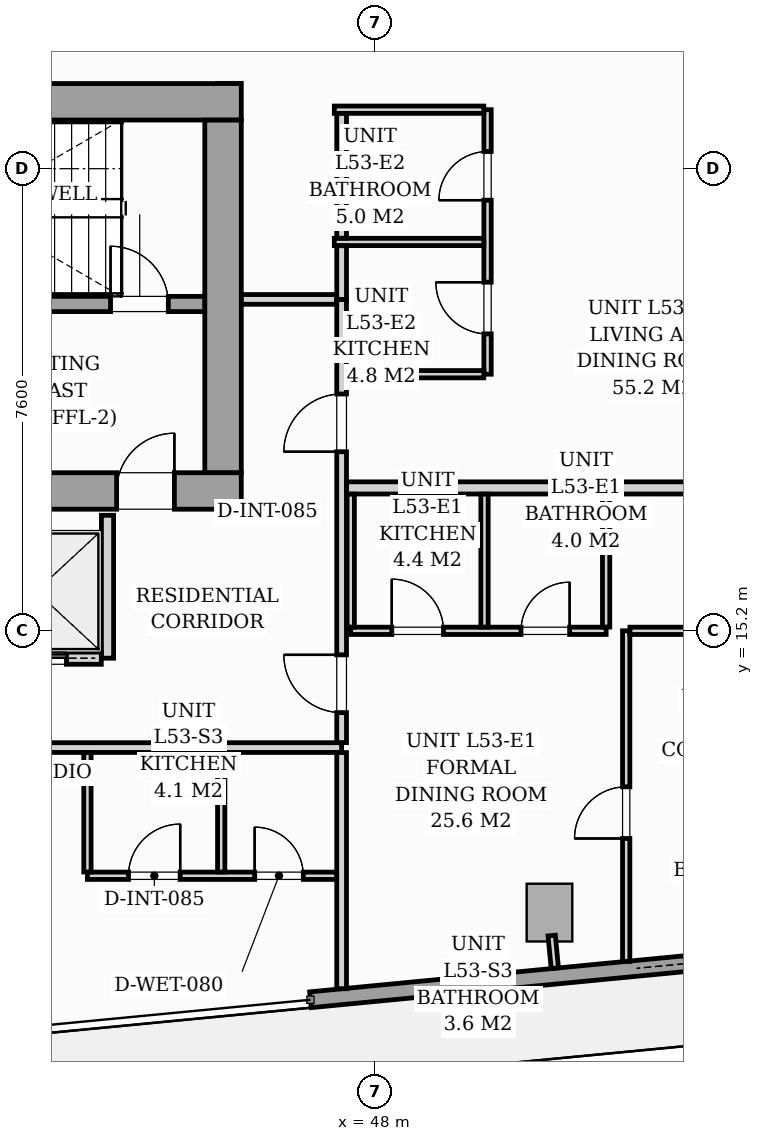
"""IFC4 building model, lengths in metres.
Left out: names, types, materials, properties, quantities, classifications, styles, units other than length and angle.
Written with IfcOpenShell. Run it as: python <this file> out.ifc"""

import sys

from ifc_helpers import new_model, si_unit, direction, frame, frame_2d, origin, origin_2d, place, context, subcontext, project, spatial, rectangle, i_section, extrude, source, transform, mapped, element, fill, save


model = new_model("IFC4")
c1 = context("Model", 3, precision=1e-05, world=origin(), true_north=direction((0.0, 1.0)))
c2 = subcontext(c1, "Body", "Model", "MODEL_VIEW")
j1 = project(units=[si_unit("LENGTHUNIT", "METRE"), si_unit("PLANEANGLEUNIT", "RADIAN")], contexts=[c1])
p1 = place(None, origin())
s1 = spatial("IfcSite", under=j1, at=p1, CompositionType="ELEMENT")
p2 = place(p1, origin())
s2 = spatial("IfcBuilding", under=s1, at=p2, CompositionType="ELEMENT")
p3 = place(p2, frame((0.0, 0.0, 185.8)))
s3 = spatial("IfcBuildingStorey", under=s2, at=p3, CompositionType="ELEMENT", Elevation=185.8)
m1 = source(origin(), c2, "Body", "SweptSolid", [
    extrude(i_section(OverallWidth=0.416, OverallDepth=0.446, WebThickness=0.039, FlangeThickness=0.063, FilletRadius=0.018, at=origin_2d()), origin(), (0.0, 0.0, 1.0), 3.196),
])
for number, where, z_axis, x_axis in (
    (1, (45.6, 17.4, 0.002), (0.0, 0.0, 1.0), (1.0, 0.0, 0.0)),
    (2, (45.6, 24.0, 0.002), (0.0, 0.0, 1.0), (1.0, 0.0, 0.0)),
):
    element("IfcColumn", number, at=place(p3, frame(where, z_axis=z_axis, x_axis=x_axis)), inside=s3, PredefinedType="PILASTER", context=c2, shape_type="MappedRepresentation", body=[
        mapped(m1, transform((0.0, 0.0, 0.0), scale=1.0)),
    ])
m2 = source(origin(), c2, "Body", "SweptSolid", [
    extrude(rectangle(XDim=0.75, YDim=0.95, at=origin_2d()), origin(), (0.0, 0.0, 1.0), 3.196),
])
p4 = place(p3, frame((50.868, 10.566, 0.002), z_axis=(0.0, 0.0, 1.0), x_axis=(0.995396198367, 0.09584575252, 0.0)))
e3 = element("IfcColumn", 3, at=p4, inside=s3, PredefinedType="COLUMN", context=c2, shape_type="MappedRepresentation", body=[
    mapped(m2, transform((0.0, 0.0, 0.0), scale=1.0)),
])
p5 = place(p3, frame((62.963, 10.676, 0.0), z_axis=(0.0, 0.0, 1.0), x_axis=(-0.995395627913, -0.095851676732, 0.0)))
e4 = element("IfcWall", 4, at=p5, inside=s3, PredefinedType="STANDARD", context=c2, shape_type="SweptSolid", body=[
    extrude(rectangle(XDim=16.1, YDim=0.26, at=frame_2d((8.05, 0.0))), origin(), (0.0, 0.0, 1.0), 2.94),
])
p6 = place(p5, frame((8.101, 0.0, 0.0)))
e5 = element("IfcOpeningElement", 5, at=p6, cuts=e4, PredefinedType="OPENING", context=c2, shape_type="SweptSolid", body=[
    extrude(rectangle(XDim=1.8, YDim=2.06, at=frame_2d((0.9, 1.03))), frame((0.0, 0.14, 0.0), z_axis=(0.0, -1.0, 0.0), x_axis=(1.0, 0.0, 0.0)), (0.0, 0.0, 1.0), 0.28),
])
p7 = place(p5, frame((2.05, 0.0, 0.65)))
e6 = element("IfcOpeningElement", 6, at=p7, cuts=e4, PredefinedType="OPENING", context=c2, shape_type="SweptSolid", body=[
    extrude(rectangle(XDim=1.6, YDim=1.5, at=frame_2d((0.8, 0.75))), frame((0.0, 0.14, 0.0), z_axis=(0.0, -1.0, 0.0), x_axis=(1.0, 0.0, 0.0)), (0.0, 0.0, 1.0), 0.28),
])
p8 = place(p3, frame((26.2, 17.5, 0.0), z_axis=(0.0, 0.0, 1.0), x_axis=(1.0, 0.0, 0.0)))
e7 = element("IfcWall", 7, at=p8, inside=s3, PredefinedType="SHEAR", context=c2, shape_type="SweptSolid", body=[
    extrude(rectangle(XDim=19.6, YDim=0.6, at=frame_2d((9.8, 0.0))), origin(), (0.0, 0.0, 1.0), 3.2),
])
p9 = place(p8, frame((0.95, 0.0, 0.0)))
e8 = element("IfcOpeningElement", 8, at=p9, cuts=e7, PredefinedType="OPENING", context=c2, shape_type="SweptSolid", body=[
    extrude(rectangle(XDim=0.95, YDim=2.06, at=frame_2d((0.475, 1.03))), frame((0.0, 0.31, 0.0), z_axis=(0.0, -1.0, 0.0), x_axis=(1.0, 0.0, 0.0)), (0.0, 0.0, 1.0), 0.62),
])
p10 = place(p8, frame((9.38, 0.0, 0.0)))
e9 = element("IfcOpeningElement", 9, at=p10, cuts=e7, PredefinedType="OPENING", context=c2, shape_type="SweptSolid", body=[
    extrude(rectangle(XDim=0.85, YDim=2.0, at=frame_2d((0.425, 1.0))), frame((0.0, 0.31, 0.0), z_axis=(0.0, -1.0, 0.0), x_axis=(1.0, 0.0, 0.0)), (0.0, 0.0, 1.0), 0.62),
])
p11 = place(p8, frame((17.55, 0.0, 0.0)))
e10 = element("IfcOpeningElement", 10, at=p11, cuts=e7, PredefinedType="OPENING", context=c2, shape_type="SweptSolid", body=[
    extrude(rectangle(XDim=0.95, YDim=2.06, at=frame_2d((0.475, 1.03))), frame((0.0, 0.31, 0.0), z_axis=(0.0, -1.0, 0.0), x_axis=(1.0, 0.0, 0.0)), (0.0, 0.0, 1.0), 0.62),
])
p12 = place(p3, frame((26.2, 23.9, 0.0), z_axis=(0.0, 0.0, 1.0), x_axis=(1.0, 0.0, 0.0)))
e11 = element("IfcWall", 11, at=p12, inside=s3, PredefinedType="SHEAR", context=c2, shape_type="SweptSolid", body=[
    extrude(rectangle(XDim=19.6, YDim=0.6, at=frame_2d((9.8, 0.0))), origin(), (0.0, 0.0, 1.0), 3.2),
])
p13 = place(p3, frame((45.5, 17.802, 0.0), z_axis=(0.0, 0.0, 1.0), x_axis=(0.0, 1.0, 0.0)))
e12 = element("IfcWall", 12, at=p13, inside=s3, PredefinedType="SHEAR", context=c2, shape_type="SweptSolid", body=[
    extrude(rectangle(XDim=5.796, YDim=0.6, at=frame_2d((2.898, 0.0))), origin(), (0.0, 0.0, 1.0), 3.2),
])
p14 = place(p3, frame((37.05, 20.575, 0.0), z_axis=(0.0, 0.0, 1.0), x_axis=(1.0, 0.0, 0.0)))
e13 = element("IfcWall", 13, at=p14, inside=s3, PredefinedType="SOLIDWALL", context=c2, shape_type="SweptSolid", body=[
    extrude(rectangle(XDim=8.148, YDim=0.25, at=frame_2d((4.074, 0.0))), origin(), (0.0, 0.0, 1.0), 3.2),
])
p15 = place(p14, frame((6.6, 0.0, 0.0)))
e14 = element("IfcOpeningElement", 14, at=p15, cuts=e13, PredefinedType="OPENING", context=c2, shape_type="SweptSolid", body=[
    extrude(rectangle(XDim=0.95, YDim=2.06, at=frame_2d((0.475, 1.03))), frame((0.0, 0.135, 0.0), z_axis=(0.0, -1.0, 0.0), x_axis=(1.0, 0.0, 0.0)), (0.0, 0.0, 1.0), 0.27),
])
p16 = place(p3, frame((43.6, 14.75, 0.0), z_axis=(0.0, 0.0, 1.0), x_axis=(0.0, 1.0, 0.0)))
e15 = element("IfcWall", 15, at=p16, inside=s3, PredefinedType="PARTITIONING", context=c2, shape_type="SweptSolid", body=[
    extrude(rectangle(XDim=2.35, YDim=0.2, at=frame_2d((1.175, 0.0))), origin(), (0.0, 0.0, 1.0), 2.94),
])
p17 = place(p3, frame((41.352, 14.75, 0.0), z_axis=(0.0, 0.0, 1.0), x_axis=(1.0, 0.0, 0.0)))
e16 = element("IfcWall", 16, at=p17, inside=s3, PredefinedType="PARTITIONING", context=c2, shape_type="SweptSolid", body=[
    extrude(rectangle(XDim=2.146, YDim=0.2, at=frame_2d((1.073, 0.0))), origin(), (0.0, 0.0, 1.0), 2.94),
])
p18 = place(p17, frame((0.523, 0.0, 0.0)))
e17 = element("IfcOpeningElement", 17, at=p18, cuts=e16, PredefinedType="OPENING", context=c2, shape_type="SweptSolid", body=[
    extrude(rectangle(XDim=1.05, YDim=2.08, at=frame_2d((0.525, 1.04))), frame((0.0, 0.11, 0.0), z_axis=(0.0, -1.0, 0.0), x_axis=(1.0, 0.0, 0.0)), (0.0, 0.0, 1.0), 0.22),
])
p19 = place(p3, frame((26.12, 13.28, 0.0), z_axis=(0.0, 0.0, 1.0), x_axis=(1.0, 0.0, 0.0)))
e18 = element("IfcWall", 18, at=p19, inside=s3, PredefinedType="PARTITIONING", context=c2, shape_type="SweptSolid", body=[
    extrude(rectangle(XDim=21.33, YDim=0.16, at=frame_2d((10.665, 0.0))), origin(), (0.0, 0.0, 1.0), 2.94),
])
p20 = place(p19, frame((4.704, 0.0, 0.0)))
e19 = element("IfcOpeningElement", 19, at=p20, cuts=e18, PredefinedType="OPENING", context=c2, shape_type="SweptSolid", body=[
    extrude(rectangle(XDim=0.95, YDim=2.06, at=frame_2d((0.475, 1.03))), frame((0.0, 0.09, 0.0), z_axis=(0.0, -1.0, 0.0), x_axis=(1.0, 0.0, 0.0)), (0.0, 0.0, 1.0), 0.18),
])
p21 = place(p19, frame((11.6, 0.0, 0.0)))
e20 = element("IfcOpeningElement", 20, at=p21, cuts=e18, PredefinedType="OPENING", context=c2, shape_type="SweptSolid", body=[
    extrude(rectangle(XDim=0.95, YDim=2.06, at=frame_2d((0.475, 1.03))), frame((0.0, 0.09, 0.0), z_axis=(0.0, -1.0, 0.0), x_axis=(1.0, 0.0, 0.0)), (0.0, 0.0, 1.0), 0.18),
])
p22 = place(p19, frame((14.976, 0.0, 0.0)))
e21 = element("IfcOpeningElement", 21, at=p22, cuts=e18, PredefinedType="OPENING", context=c2, shape_type="SweptSolid", body=[
    extrude(rectangle(XDim=0.95, YDim=2.06, at=frame_2d((0.475, 1.03))), frame((0.0, 0.09, 0.0), z_axis=(0.0, -1.0, 0.0), x_axis=(1.0, 0.0, 0.0)), (0.0, 0.0, 1.0), 0.18),
])
p23 = place(p3, frame((47.45, 9.315, 0.0), z_axis=(0.0, 0.0, 1.0), x_axis=(0.0, 1.0, 0.0)))
e22 = element("IfcWall", 22, at=p23, inside=s3, PredefinedType="PARTITIONING", context=c2, shape_type="SweptSolid", body=[
    extrude(rectangle(XDim=3.883, YDim=0.16, at=frame_2d((1.941, 0.0))), origin(), (0.0, 0.0, 1.0), 2.94),
])
p24 = place(p3, frame((47.45, 13.362, 0.0), z_axis=(0.0, 0.0, 1.0), x_axis=(0.0, 1.0, 0.0)))
e23 = element("IfcWall", 23, at=p24, inside=s3, PredefinedType="PARTITIONING", context=c2, shape_type="SweptSolid", body=[
    extrude(rectangle(XDim=7.288, YDim=0.16, at=frame_2d((3.644, 0.0))), origin(), (0.0, 0.0, 1.0), 2.94),
])
p25 = place(p24, frame((0.493, 0.0, 0.0)))
e24 = element("IfcOpeningElement", 24, at=p25, cuts=e23, PredefinedType="OPENING", context=c2, shape_type="SweptSolid", body=[
    extrude(rectangle(XDim=0.95, YDim=2.06, at=frame_2d((0.475, 1.03))), frame((0.0, 0.09, 0.0), z_axis=(0.0, -1.0, 0.0), x_axis=(1.0, 0.0, 0.0)), (0.0, 0.0, 1.0), 0.18),
])
p26 = place(p24, frame((4.783, 0.0, 0.0)))
e25 = element("IfcOpeningElement", 25, at=p26, cuts=e23, PredefinedType="OPENING", context=c2, shape_type="SweptSolid", body=[
    extrude(rectangle(XDim=0.95, YDim=2.06, at=frame_2d((0.475, 1.03))), frame((0.0, 0.09, 0.0), z_axis=(0.0, -1.0, 0.0), x_axis=(1.0, 0.0, 0.0)), (0.0, 0.0, 1.0), 0.18),
])
p27 = place(p3, frame((45.802, 20.65, 0.0), z_axis=(0.0, 0.0, 1.0), x_axis=(1.0, 0.0, 0.0)))
e26 = element("IfcWall", 26, at=p27, inside=s3, PredefinedType="PARTITIONING", context=c2, shape_type="SweptSolid", body=[
    extrude(rectangle(XDim=1.566, YDim=0.16, at=frame_2d((0.783, 0.0))), origin(), (0.0, 0.0, 1.0), 2.94),
])
p28 = place(p3, frame((43.27, 11.172, 0.0), z_axis=(0.0, 0.0, 1.0), x_axis=(1.0, 0.0, 0.0)))
e27 = element("IfcWall", 27, at=p28, inside=s3, PredefinedType="PARTITIONING", context=c2, shape_type="SweptSolid", body=[
    extrude(rectangle(XDim=4.098, YDim=0.12, at=frame_2d((2.049, 0.0))), origin(), (0.0, 0.0, 1.0), 2.94),
])
p29 = place(p28, frame((0.675, 0.0, 0.0)))
e28 = element("IfcOpeningElement", 28, at=p29, cuts=e27, PredefinedType="OPENING", context=c2, shape_type="SweptSolid", body=[
    extrude(rectangle(XDim=0.85, YDim=2.05, at=frame_2d((0.425, 1.025))), frame((0.0, 0.07, 0.0), z_axis=(0.0, -1.0, 0.0), x_axis=(1.0, 0.0, 0.0)), (0.0, 0.0, 1.0), 0.14),
])
p30 = place(p28, frame((2.75, 0.0, 0.0)))
e29 = element("IfcOpeningElement", 29, at=p30, cuts=e27, PredefinedType="OPENING", context=c2, shape_type="SweptSolid", body=[
    extrude(rectangle(XDim=0.8, YDim=2.02, at=frame_2d((0.4, 1.01))), frame((0.0, 0.07, 0.0), z_axis=(0.0, -1.0, 0.0), x_axis=(1.0, 0.0, 0.0)), (0.0, 0.0, 1.0), 0.14),
])
for number, where, z_axis, x_axis in (
    (30, (43.27, 11.234, 0.0), (0.0, 0.0, 1.0), (0.0, 1.0, 0.0)),
    (31, (45.47, 11.234, 0.0), (0.0, 0.0, 1.0), (0.0, 1.0, 0.0)),
):
    element("IfcWall", number, at=place(p3, frame(where, z_axis=z_axis, x_axis=x_axis)), inside=s3, PredefinedType="PARTITIONING", context=c2, shape_type="SweptSolid", body=[
        extrude(rectangle(XDim=1.964, YDim=0.12, at=frame_2d((0.982, 0.0))), origin(), (0.0, 0.0, 1.0), 2.94),
    ])
p31 = place(p3, frame((47.532, 17.55, 0.0), z_axis=(0.0, 0.0, 1.0), x_axis=(1.0, 0.0, 0.0)))
e32 = element("IfcWall", 32, at=p31, inside=s3, PredefinedType="PARTITIONING", context=c2, shape_type="SweptSolid", body=[
    extrude(rectangle(XDim=17.201, YDim=0.2, at=frame_2d((8.601, 0.0))), origin(), (0.0, 0.0, 1.0), 2.281),
])
p32 = place(p3, frame((47.6, 15.2, 0.0), z_axis=(0.0, 0.0, 1.0), x_axis=(1.0, 0.0, 0.0)))
e33 = element("IfcWall", 33, at=p32, inside=s3, PredefinedType="PARTITIONING", context=c2, shape_type="SweptSolid", body=[
    extrude(rectangle(XDim=4.2, YDim=0.12, at=frame_2d((2.1, 0.0))), origin(), (0.0, 0.0, 1.0), 2.94),
])
p33 = place(p32, frame((0.675, 0.0, 0.0)))
e34 = element("IfcOpeningElement", 34, at=p33, cuts=e33, PredefinedType="OPENING", context=c2, shape_type="SweptSolid", body=[
    extrude(rectangle(XDim=0.85, YDim=2.05, at=frame_2d((0.425, 1.025))), frame((0.0, 0.07, 0.0), z_axis=(0.0, -1.0, 0.0), x_axis=(1.0, 0.0, 0.0)), (0.0, 0.0, 1.0), 0.14),
])
p34 = place(p32, frame((2.8, 0.0, 0.0)))
e35 = element("IfcOpeningElement", 35, at=p34, cuts=e33, PredefinedType="OPENING", context=c2, shape_type="SweptSolid", body=[
    extrude(rectangle(XDim=0.8, YDim=2.02, at=frame_2d((0.4, 1.01))), frame((0.0, 0.07, 0.0), z_axis=(0.0, -1.0, 0.0), x_axis=(1.0, 0.0, 0.0)), (0.0, 0.0, 1.0), 0.14),
])
for number, where, z_axis, x_axis in (
    (36, (47.6, 15.262, 0.0), (0.0, 0.0, 1.0), (0.0, 1.0, 0.0)),
    (37, (49.8, 15.262, 0.0), (0.0, 0.0, 1.0), (0.0, 1.0, 0.0)),
    (38, (51.8, 15.262, 0.0), (0.0, 0.0, 1.0), (0.0, 1.0, 0.0)),
):
    element("IfcWall", number, at=place(p3, frame(where, z_axis=z_axis, x_axis=x_axis)), inside=s3, PredefinedType="PARTITIONING", context=c2, shape_type="SweptSolid", body=[
        extrude(rectangle(XDim=2.186, YDim=0.12, at=frame_2d((1.093, 0.0))), origin(), (0.0, 0.0, 1.0), 2.94),
    ])
p35 = place(p3, frame((52.13, 9.766, 0.0), z_axis=(0.0, 0.0, 1.0), x_axis=(0.0, 1.0, 0.0)))
e39 = element("IfcWall", 39, at=p35, inside=s3, PredefinedType="PARTITIONING", context=c2, shape_type="SweptSolid", body=[
    extrude(rectangle(XDim=5.434, YDim=0.12, at=frame_2d((2.717, 0.0))), origin(), (0.0, 0.0, 1.0), 2.94),
])
p36 = place(p35, frame((2.019, 0.0, 0.0)))
e40 = element("IfcOpeningElement", 40, at=p36, cuts=e39, PredefinedType="OPENING", context=c2, shape_type="SweptSolid", body=[
    extrude(rectangle(XDim=0.85, YDim=2.05, at=frame_2d((0.425, 1.025))), frame((0.0, 0.07, 0.0), z_axis=(0.0, -1.0, 0.0), x_axis=(1.0, 0.0, 0.0)), (0.0, 0.0, 1.0), 0.14),
])
p37 = place(p3, frame((52.192, 15.2, 0.0), z_axis=(0.0, 0.0, 1.0), x_axis=(1.0, 0.0, 0.0)))
e41 = element("IfcWall", 41, at=p37, inside=s3, PredefinedType="PARTITIONING", context=c2, shape_type="SweptSolid", body=[
    extrude(rectangle(XDim=4.206, YDim=0.12, at=frame_2d((2.103, 0.0))), origin(), (0.0, 0.0, 1.0), 2.94),
])
p38 = place(p3, frame((49.85, 19.42, 0.0), z_axis=(0.0, 0.0, 1.0), x_axis=(0.0, 1.0, 0.0)))
e42 = element("IfcWall", 42, at=p38, inside=s3, PredefinedType="PARTITIONING", context=c2, shape_type="SweptSolid", body=[
    extrude(rectangle(XDim=4.35, YDim=0.12, at=frame_2d((2.175, 0.0))), origin(), (0.0, 0.0, 1.0), 2.94),
])
p39 = place(p38, frame((0.663, 0.0, 0.0)))
e43 = element("IfcOpeningElement", 43, at=p39, cuts=e42, PredefinedType="OPENING", context=c2, shape_type="SweptSolid", body=[
    extrude(rectangle(XDim=0.85, YDim=2.05, at=frame_2d((0.425, 1.025))), frame((0.0, 0.07, 0.0), z_axis=(0.0, -1.0, 0.0), x_axis=(1.0, 0.0, 0.0)), (0.0, 0.0, 1.0), 0.14),
])
p40 = place(p38, frame((2.862, 0.0, 0.0)))
e44 = element("IfcOpeningElement", 44, at=p40, cuts=e42, PredefinedType="OPENING", context=c2, shape_type="SweptSolid", body=[
    extrude(rectangle(XDim=0.8, YDim=2.02, at=frame_2d((0.4, 1.01))), frame((0.0, 0.07, 0.0), z_axis=(0.0, -1.0, 0.0), x_axis=(1.0, 0.0, 0.0)), (0.0, 0.0, 1.0), 0.14),
])
p41 = place(p3, frame((47.33, 21.595, 0.0), z_axis=(0.0, 0.0, 1.0), x_axis=(1.0, 0.0, 0.0)))
e45 = element("IfcWall", 45, at=p41, inside=s3, PredefinedType="PARTITIONING", context=c2, shape_type="SweptSolid", body=[
    extrude(rectangle(XDim=2.458, YDim=0.12, at=frame_2d((1.229, 0.0))), origin(), (0.0, 0.0, 1.0), 2.94),
])
p42 = place(p3, frame((47.532, 19.42, 0.0), z_axis=(0.0, 0.0, 1.0), x_axis=(1.0, 0.0, 0.0)))
e46 = element("IfcWall", 46, at=p42, inside=s3, PredefinedType="PARTITIONING", context=c2, shape_type="SweptSolid", body=[
    extrude(rectangle(XDim=2.256, YDim=0.12, at=frame_2d((1.128, 0.0))), origin(), (0.0, 0.0, 1.0), 2.94),
])
p43 = place(p3, frame((47.33, 23.77, 0.0), z_axis=(0.0, 0.0, 1.0), x_axis=(1.0, 0.0, 0.0)))
e47 = element("IfcWall", 47, at=p43, inside=s3, PredefinedType="PARTITIONING", context=c2, shape_type="SweptSolid", body=[
    extrude(rectangle(XDim=2.458, YDim=0.12, at=frame_2d((1.229, 0.0))), origin(), (0.0, 0.0, 1.0), 2.94),
])
p44 = place(p3, frame((47.45, 20.65, 0.0), z_axis=(0.0, 0.0, 1.0), x_axis=(0.0, 1.0, 0.0)))
e48 = element("IfcWall", 48, at=p44, inside=s3, PredefinedType="PARTITIONING", context=c2, shape_type="SweptSolid", body=[
    extrude(rectangle(XDim=0.883, YDim=0.16, at=frame_2d((0.441, 0.0))), origin(), (0.0, 0.0, 1.0), 2.94),
])
p45 = place(p3, frame((47.45, 21.657, 0.0), z_axis=(0.0, 0.0, 1.0), x_axis=(0.0, 1.0, 0.0)))
e49 = element("IfcWall", 49, at=p45, inside=s3, PredefinedType="PARTITIONING", context=c2, shape_type="SweptSolid", body=[
    extrude(rectangle(XDim=2.051, YDim=0.16, at=frame_2d((1.025, 0.0))), origin(), (0.0, 0.0, 1.0), 2.94),
])
p46 = place(p3, frame((50.905, 10.188, 0.0), z_axis=(0.0, 0.0, 1.0), x_axis=(0.095772948675, -0.995403205893, 0.0)))
e50 = element("IfcWall", 50, at=p46, inside=s3, PredefinedType="PARTITIONING", context=c2, shape_type="SweptSolid", body=[
    extrude(rectangle(XDim=0.538, YDim=0.12, at=frame_2d((0.269, 0.0))), origin(), (0.0, 0.0, 1.0), 2.94),
])
m3 = source(origin(), c2, "Body", "SweptSolid", [
    extrude(rectangle(XDim=0.95, YDim=2.06, at=frame_2d((0.475, 1.03))), frame((0.0, 0.025, 0.0), z_axis=(0.0, -1.0, 0.0), x_axis=(1.0, 0.0, 0.0)), (0.0, 0.0, 1.0), 0.05),
])
p47 = place(p11, origin())
e51 = element("IfcDoor", 51, at=p47, inside=s3, OperationType="SINGLE_SWING_RIGHT", PredefinedType="DOOR", context=c2, shape_type="MappedRepresentation", body=[
    mapped(m3, transform((0.0, 0.0, 0.0), scale=1.0)),
])
fill(e10, e51)
p48 = place(p15, origin())
e52 = element("IfcDoor", 52, at=p48, inside=s3, OperationType="SINGLE_SWING_LEFT", PredefinedType="DOOR", context=c2, shape_type="MappedRepresentation", body=[
    mapped(m3, transform((0.0, 0.0, 0.0), scale=1.0)),
])
fill(e14, e52)
m4 = source(origin(), c2, "Body", "SweptSolid", [
    extrude(rectangle(XDim=1.05, YDim=2.08, at=frame_2d((0.525, 1.04))), frame((0.0, 0.025, 0.0), z_axis=(0.0, -1.0, 0.0), x_axis=(1.0, 0.0, 0.0)), (0.0, 0.0, 1.0), 0.05),
])
p49 = place(p18, origin())
e53 = element("IfcDoor", 53, at=p49, inside=s3, OperationType="SLIDING_TO_RIGHT", PredefinedType="DOOR", context=c2, shape_type="MappedRepresentation", body=[
    mapped(m4, transform((0.0, 0.0, 0.0), scale=1.0)),
])
fill(e17, e53)
m5 = source(origin(), c2, "Body", "SweptSolid", [
    extrude(rectangle(XDim=0.85, YDim=2.05, at=frame_2d((0.425, 1.025))), frame((0.0, 0.025, 0.0), z_axis=(0.0, -1.0, 0.0), x_axis=(1.0, 0.0, 0.0)), (0.0, 0.0, 1.0), 0.05),
])
p50 = place(p29, origin())
e54 = element("IfcDoor", 54, at=p50, inside=s3, OperationType="SINGLE_SWING_RIGHT", PredefinedType="DOOR", context=c2, shape_type="MappedRepresentation", body=[
    mapped(m5, transform((0.0, 0.0, 0.0), scale=1.0)),
])
fill(e28, e54)
m6 = source(origin(), c2, "Body", "SweptSolid", [
    extrude(rectangle(XDim=0.8, YDim=2.02, at=frame_2d((0.4, 1.01))), frame((0.0, 0.025, 0.0), z_axis=(0.0, -1.0, 0.0), x_axis=(1.0, 0.0, 0.0)), (0.0, 0.0, 1.0), 0.05),
])
p51 = place(p30, origin())
e55 = element("IfcDoor", 55, at=p51, inside=s3, OperationType="SINGLE_SWING_LEFT", PredefinedType="DOOR", context=c2, shape_type="MappedRepresentation", body=[
    mapped(m6, transform((0.0, 0.0, 0.0), scale=1.0)),
])
fill(e29, e55)
m7 = source(origin(), c2, "Body", "SweptSolid", [
    extrude(rectangle(XDim=0.95, YDim=2.06, at=frame_2d((0.475, 1.03))), frame((0.0, 0.025, 0.0), z_axis=(0.0, -1.0, 0.0), x_axis=(1.0, 0.0, 0.0)), (0.0, 0.0, 1.0), 0.05),
])
p52 = place(p25, origin())
e56 = element("IfcDoor", 56, at=p52, inside=s3, OperationType="SINGLE_SWING_RIGHT", PredefinedType="DOOR", context=c2, shape_type="MappedRepresentation", body=[
    mapped(m7, transform((0.0, 0.0, 0.0), scale=1.0)),
])
fill(e24, e56)
p53 = place(p36, origin())
e57 = element("IfcDoor", 57, at=p53, inside=s3, OperationType="SINGLE_SWING_LEFT", PredefinedType="DOOR", context=c2, shape_type="MappedRepresentation", body=[
    mapped(m5, transform((0.0, 0.0, 0.0), scale=1.0)),
])
fill(e40, e57)
p54 = place(p33, origin())
e58 = element("IfcDoor", 58, at=p54, inside=s3, OperationType="SINGLE_SWING_LEFT", PredefinedType="DOOR", context=c2, shape_type="MappedRepresentation", body=[
    mapped(m5, transform((0.0, 0.0, 0.0), scale=1.0)),
])
fill(e34, e58)
p55 = place(p34, origin())
e59 = element("IfcDoor", 59, at=p55, inside=s3, OperationType="SINGLE_SWING_RIGHT", PredefinedType="DOOR", context=c2, shape_type="MappedRepresentation", body=[
    mapped(m6, transform((0.0, 0.0, 0.0), scale=1.0)),
])
fill(e35, e59)
p56 = place(p26, origin())
e60 = element("IfcDoor", 60, at=p56, inside=s3, OperationType="SINGLE_SWING_LEFT", PredefinedType="DOOR", context=c2, shape_type="MappedRepresentation", body=[
    mapped(m7, transform((0.0, 0.0, 0.0), scale=1.0)),
])
fill(e25, e60)
p57 = place(p39, origin())
e61 = element("IfcDoor", 61, at=p57, inside=s3, OperationType="SINGLE_SWING_RIGHT", PredefinedType="DOOR", context=c2, shape_type="MappedRepresentation", body=[
    mapped(m5, transform((0.0, 0.0, 0.0), scale=1.0)),
])
fill(e43, e61)
p58 = place(p40, origin())
e62 = element("IfcDoor", 62, at=p58, inside=s3, OperationType="SINGLE_SWING_LEFT", PredefinedType="DOOR", context=c2, shape_type="MappedRepresentation", body=[
    mapped(m6, transform((0.0, 0.0, 0.0), scale=1.0)),
])
fill(e44, e62)
save(model, sys.argv[1])
